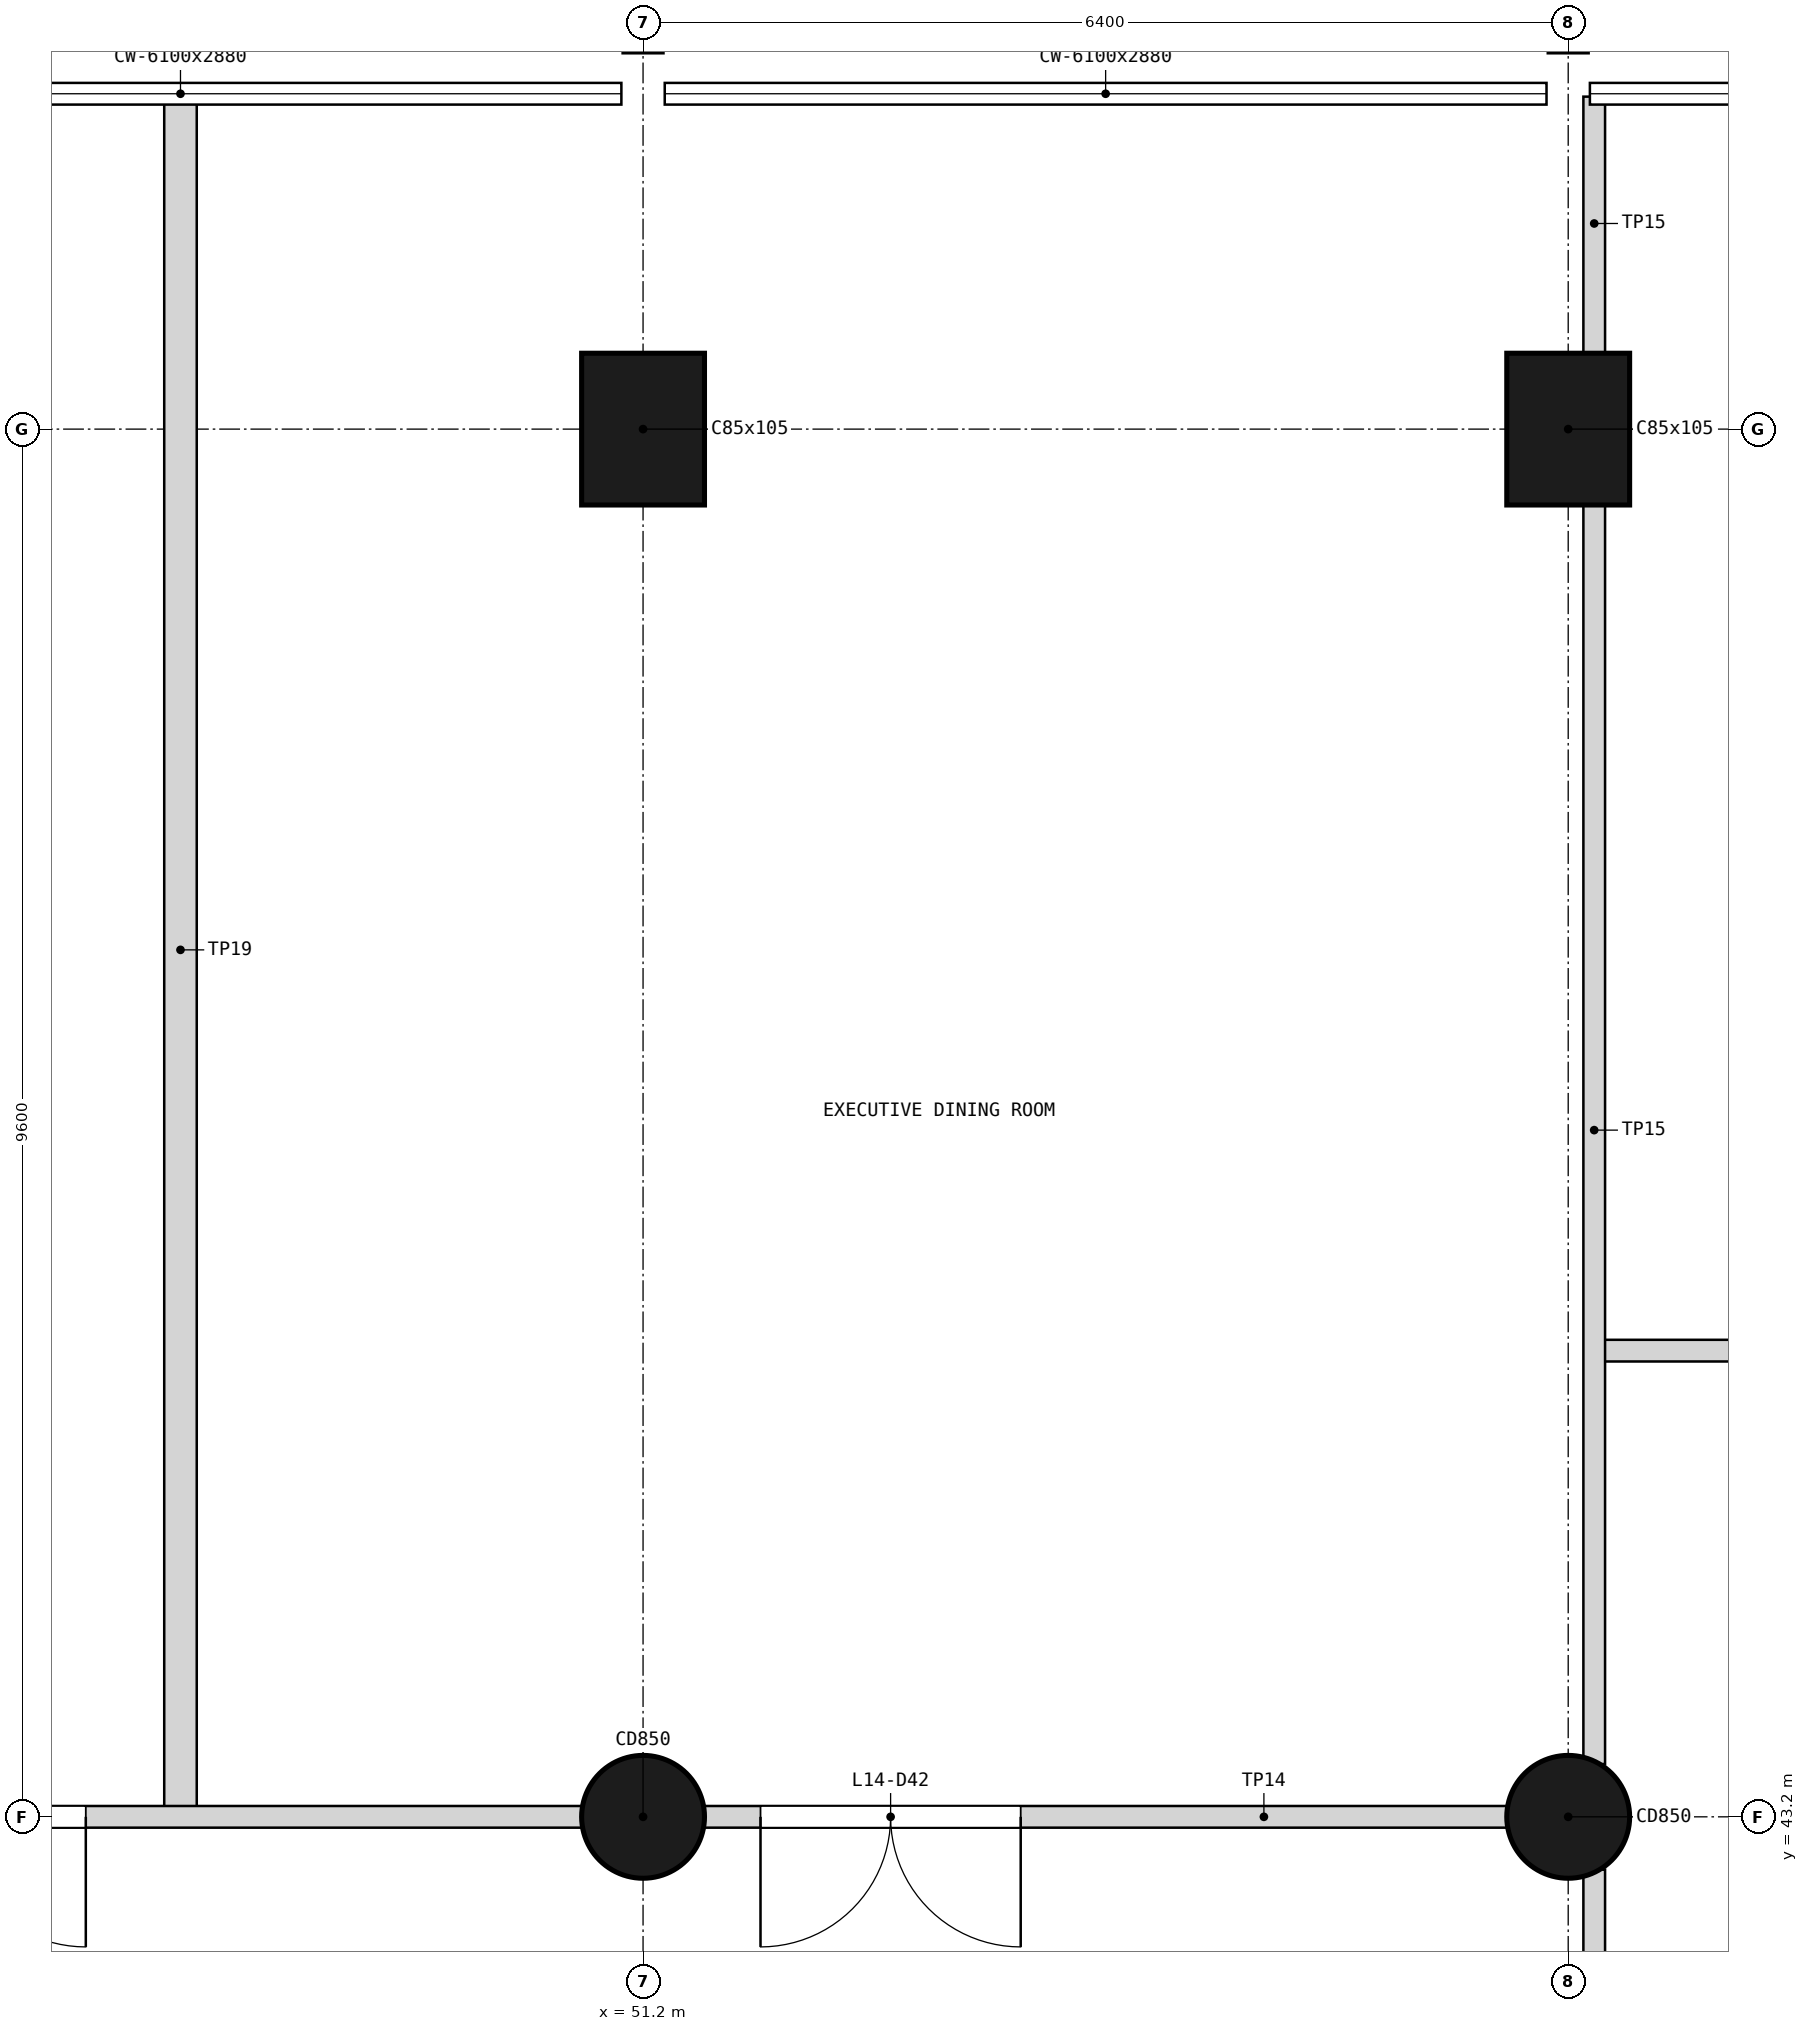
"""IFC4 building model, lengths in metres.
Left out: names, types, materials, properties, quantities, classifications, styles, units other than length and angle.
Written with IfcOpenShell. Run it as: python <this file> out.ifc"""

import sys

from ifc_helpers import new_model, si_unit, direction, frame, frame_2d, origin, origin_2d, place, context, subcontext, project, spatial, rectangle, circle, extrude, element, fill, save


model = new_model("IFC4")
c1 = context("Model", 3, precision=1e-05, world=origin(), true_north=direction((0.0, 1.0)))
c2 = subcontext(c1, "Body", "Model", "MODEL_VIEW")
j1 = project(units=[si_unit("LENGTHUNIT", "METRE"), si_unit("PLANEANGLEUNIT", "RADIAN")], contexts=[c1])
p1 = place(None, origin())
s1 = spatial("IfcSite", under=j1, at=p1, CompositionType="ELEMENT")
p2 = place(p1, origin())
s2 = spatial("IfcBuilding", under=s1, at=p2, CompositionType="ELEMENT")
p3 = place(p2, frame((0.0, 0.0, 56.1)))
s3 = spatial("IfcBuildingStorey", under=s2, at=p3, CompositionType="ELEMENT", Elevation=56.1)
p4 = place(p3, frame((51.2, 43.2, 0.0), z_axis=(0.0, 0.0, 1.0), x_axis=(1.0, 0.0, 0.0)))
e1 = element("IfcColumn", 1, at=p4, inside=s3, PredefinedType="COLUMN", context=c2, shape_type="SweptSolid", body=[
    extrude(circle(Radius=0.425, at=origin_2d()), origin(), (0.0, 0.0, 1.0), 3.9),
])
p5 = place(p3, frame((51.2, 52.8, 0.0), z_axis=(0.0, 0.0, 1.0), x_axis=(1.0, 0.0, 0.0)))
e2 = element("IfcColumn", 2, at=p5, inside=s3, PredefinedType="COLUMN", context=c2, shape_type="SweptSolid", body=[
    extrude(rectangle(XDim=0.85, YDim=1.05, at=origin_2d()), origin(), (0.0, 0.0, 1.0), 3.9),
])
p6 = place(p3, frame((57.6, 43.2, 0.0), z_axis=(0.0, 0.0, 1.0), x_axis=(1.0, 0.0, 0.0)))
e3 = element("IfcColumn", 3, at=p6, inside=s3, PredefinedType="COLUMN", context=c2, shape_type="SweptSolid", body=[
    extrude(circle(Radius=0.425, at=origin_2d()), origin(), (0.0, 0.0, 1.0), 3.9),
])
p7 = place(p3, frame((57.6, 52.8, 0.0), z_axis=(0.0, 0.0, 1.0), x_axis=(1.0, 0.0, 0.0)))
e4 = element("IfcColumn", 4, at=p7, inside=s3, PredefinedType="COLUMN", context=c2, shape_type="SweptSolid", body=[
    extrude(rectangle(XDim=0.85, YDim=1.05, at=origin_2d()), origin(), (0.0, 0.0, 1.0), 3.9),
])
p8 = place(p3, frame((48.0, 43.2, 0.0), z_axis=(0.0, 0.0, 1.0), x_axis=(0.0, 1.0, 0.0)))
e5 = element("IfcWall", 5, at=p8, inside=s3, PredefinedType="PARTITIONING", context=c2, shape_type="SweptSolid", body=[
    extrude(rectangle(XDim=11.9, YDim=0.225, at=frame_2d((5.95, 0.0))), origin(), (0.0, 0.0, 1.0), 3.08),
])
p9 = place(p3, frame((31.82, 43.2, 0.0), z_axis=(0.0, 0.0, 1.0), x_axis=(1.0, 0.0, 0.0)))
e6 = element("IfcWall", 6, at=p9, inside=s3, PredefinedType="PARTITIONING", context=c2, shape_type="SweptSolid", body=[
    extrude(rectangle(XDim=25.96, YDim=0.15, at=frame_2d((12.98, 0.0))), origin(), (0.0, 0.0, 1.0), 2.88),
])
p10 = place(p9, frame((7.975, 0.0, 0.0)))
e7 = element("IfcOpeningElement", 7, at=p10, cuts=e6, PredefinedType="OPENING", context=c2, shape_type="SweptSolid", body=[
    extrude(rectangle(XDim=1.8, YDim=2.1, at=frame_2d((0.9, 1.05))), frame((0.0, 0.085, 0.0), z_axis=(0.0, -1.0, 0.0), x_axis=(1.0, 0.0, 0.0)), (0.0, 0.0, 1.0), 0.17),
])
p11 = place(p9, frame((13.725, 0.0, 0.0)))
e8 = element("IfcOpeningElement", 8, at=p11, cuts=e6, PredefinedType="OPENING", context=c2, shape_type="SweptSolid", body=[
    extrude(rectangle(XDim=1.8, YDim=2.1, at=frame_2d((0.9, 1.05))), frame((0.0, 0.085, 0.0), z_axis=(0.0, -1.0, 0.0), x_axis=(1.0, 0.0, 0.0)), (0.0, 0.0, 1.0), 0.17),
])
p12 = place(p9, frame((20.192, 0.0, 0.0)))
e9 = element("IfcOpeningElement", 9, at=p12, cuts=e6, PredefinedType="OPENING", context=c2, shape_type="SweptSolid", body=[
    extrude(rectangle(XDim=1.8, YDim=2.1, at=frame_2d((0.9, 1.05))), frame((0.0, 0.085, 0.0), z_axis=(0.0, -1.0, 0.0), x_axis=(1.0, 0.0, 0.0)), (0.0, 0.0, 1.0), 0.17),
])
p13 = place(p3, frame((57.78, 46.425, 0.0), z_axis=(0.0, 0.0, 1.0), x_axis=(1.0, 0.0, 0.0)))
e10 = element("IfcWall", 10, at=p13, inside=s3, PredefinedType="PARTITIONING", context=c2, shape_type="SweptSolid", body=[
    extrude(rectangle(XDim=5.97, YDim=0.15, at=frame_2d((2.985, 0.0))), origin(), (0.0, 0.0, 1.0), 3.68),
])
p14 = place(p13, frame((2.12, 0.0, 0.0)))
e11 = element("IfcOpeningElement", 11, at=p14, cuts=e10, PredefinedType="OPENING", context=c2, shape_type="SweptSolid", body=[
    extrude(rectangle(XDim=1.8, YDim=2.1, at=frame_2d((0.9, 1.05))), frame((0.0, 0.085, 0.0), z_axis=(0.0, -1.0, 0.0), x_axis=(1.0, 0.0, 0.0)), (0.0, 0.0, 1.0), 0.17),
])
p15 = place(p3, frame((57.78, 39.375, 0.0), z_axis=(0.0, 0.0, 1.0), x_axis=(0.0, 1.0, 0.0)))
e12 = element("IfcWall", 12, at=p15, inside=s3, PredefinedType="PARTITIONING", context=c2, shape_type="SweptSolid", body=[
    extrude(rectangle(XDim=3.46, YDim=0.15, at=frame_2d((1.73, 0.0))), origin(), (0.0, 0.0, 1.0), 2.78),
])
p16 = place(p3, frame((57.78, 43.565, 0.0), z_axis=(0.0, 0.0, 1.0), x_axis=(0.0, 1.0, 0.0)))
e13 = element("IfcWall", 13, at=p16, inside=s3, PredefinedType="PARTITIONING", context=c2, shape_type="SweptSolid", body=[
    extrude(rectangle(XDim=8.73, YDim=0.15, at=frame_2d((4.365, 0.0))), origin(), (0.0, 0.0, 1.0), 2.78),
])
p17 = place(p3, frame((57.78, 53.305, 0.0), z_axis=(0.0, 0.0, 1.0), x_axis=(0.0, 1.0, 0.0)))
e14 = element("IfcWall", 14, at=p17, inside=s3, PredefinedType="PARTITIONING", context=c2, shape_type="SweptSolid", body=[
    extrude(rectangle(XDim=1.795, YDim=0.15, at=frame_2d((0.897, 0.0))), origin(), (0.0, 0.0, 1.0), 2.78),
])
p18 = place(p11, frame((1.8, 0.0, 0.0), z_axis=(0.0, 0.0, 1.0), x_axis=(-1.0, 0.0, 0.0)))
e15 = element("IfcDoor", 15, at=p18, inside=s3, OperationType="DOUBLE_DOOR_SINGLE_SWING", PredefinedType="DOOR", context=c2, shape_type="SweptSolid", body=[
    extrude(rectangle(XDim=1.8, YDim=2.1, at=frame_2d((0.9, 1.05))), frame((0.0, 0.025, 0.0), z_axis=(0.0, -1.0, 0.0), x_axis=(1.0, 0.0, 0.0)), (0.0, 0.0, 1.0), 0.05),
])
fill(e8, e15)
p19 = place(p12, frame((1.8, 0.0, 0.0), z_axis=(0.0, 0.0, 1.0), x_axis=(-1.0, 0.0, 0.0)))
e16 = element("IfcDoor", 16, at=p19, inside=s3, OperationType="DOUBLE_DOOR_SINGLE_SWING", PredefinedType="DOOR", context=c2, shape_type="SweptSolid", body=[
    extrude(rectangle(XDim=1.8, YDim=2.1, at=frame_2d((0.9, 1.05))), frame((0.0, 0.025, 0.0), z_axis=(0.0, -1.0, 0.0), x_axis=(1.0, 0.0, 0.0)), (0.0, 0.0, 1.0), 0.05),
])
fill(e9, e16)
save(model, sys.argv[1])
